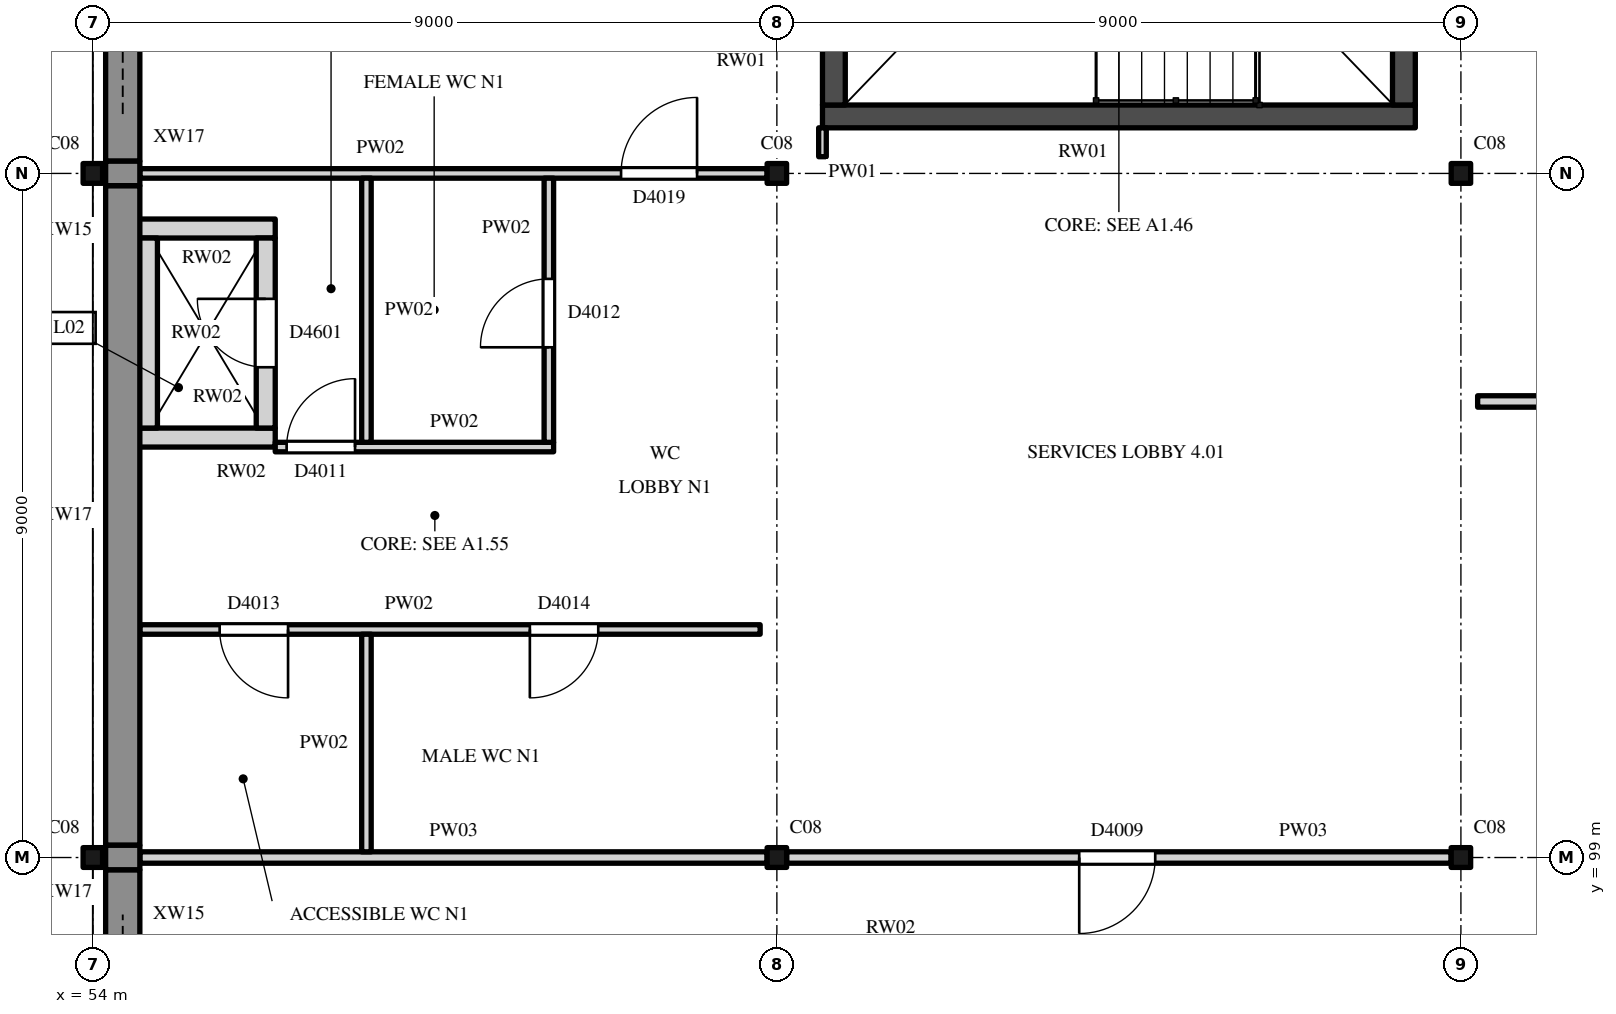
"""IFC4 building model, lengths in metres.
Left out: names, types, materials, properties, quantities, classifications, styles, units other than length and angle.
Written with IfcOpenShell. Run it as: python <this file> out.ifc"""

import sys

from ifc_helpers import new_model, si_unit, direction, frame, frame_2d, origin, origin_2d, place, context, subcontext, project, spatial, rectangle, i_section, extrude, element, fill, save


model = new_model("IFC4")
c1 = context("Model", 3, precision=1e-05, world=origin(), true_north=direction((0.0, 1.0)))
c2 = subcontext(c1, "Body", "Model", "MODEL_VIEW")
j1 = project(units=[si_unit("LENGTHUNIT", "METRE"), si_unit("PLANEANGLEUNIT", "RADIAN")], contexts=[c1])
p1 = place(None, origin())
s1 = spatial("IfcSite", under=j1, at=p1, CompositionType="ELEMENT")
p2 = place(p1, origin())
s2 = spatial("IfcBuilding", under=s1, at=p2, CompositionType="ELEMENT")
p3 = place(p2, frame((0.0, 0.0, 26.0)))
s3 = spatial("IfcBuildingStorey", under=s2, at=p3, CompositionType="ELEMENT", Elevation=26.0)
for number, where, z_axis, x_axis in (
    (1, (54.0, 99.0, 0.0), (0.0, 0.0, 1.0), (1.0, 0.0, 0.0)),
    (2, (63.0, 99.0, 0.0), (0.0, 0.0, 1.0), (1.0, 0.0, 0.0)),
    (3, (72.0, 99.0, 0.0), (0.0, 0.0, 1.0), (1.0, 0.0, 0.0)),
    (4, (54.0, 108.0, 0.0), (0.0, 0.0, 1.0), (1.0, 0.0, 0.0)),
    (5, (63.0, 108.0, 0.0), (0.0, 0.0, 1.0), (1.0, 0.0, 0.0)),
    (6, (72.0, 108.0, 0.0), (0.0, 0.0, 1.0), (1.0, 0.0, 0.0)),
):
    element("IfcColumn", number, at=place(p3, frame(where, z_axis=z_axis, x_axis=x_axis)), inside=s3, PredefinedType="COLUMN", context=c2, shape_type="SweptSolid", body=[
        extrude(i_section(OverallWidth=0.256, OverallDepth=0.26, WebThickness=0.01, FlangeThickness=0.017, FilletRadius=0.014, at=origin_2d()), origin(), (0.0, 0.0, 1.0), 5.0),
    ])
p4 = place(p3, frame((63.6, 108.75, 0.0), z_axis=(0.0, 0.0, 1.0), x_axis=(1.0, 0.0, 0.0)))
e7 = element("IfcWall", 7, at=p4, inside=s3, PredefinedType="SHEAR", context=c2, shape_type="SweptSolid", body=[
    extrude(rectangle(XDim=7.8, YDim=0.3, at=frame_2d((3.9, 0.0))), origin(), (0.0, 0.0, 1.0), 5.0),
])
p5 = place(p3, frame((63.75, 108.9, 0.0), z_axis=(0.0, 0.0, 1.0), x_axis=(0.0, 1.0, 0.0)))
e8 = element("IfcWall", 8, at=p5, inside=s3, PredefinedType="SHEAR", context=c2, shape_type="SweptSolid", body=[
    extrude(rectangle(XDim=7.8, YDim=0.3, at=frame_2d((3.9, 0.0))), origin(), (0.0, 0.0, 1.0), 5.0),
])
p6 = place(p3, frame((71.25, 108.9, 0.0), z_axis=(0.0, 0.0, 1.0), x_axis=(0.0, 1.0, 0.0)))
e9 = element("IfcWall", 9, at=p6, inside=s3, PredefinedType="SHEAR", context=c2, shape_type="SweptSolid", body=[
    extrude(rectangle(XDim=7.8, YDim=0.3, at=frame_2d((3.9, 0.0))), origin(), (0.0, 0.0, 1.0), 5.0),
])
p7 = place(p6, frame((3.0, 0.0, 0.0)))
e10 = element("IfcOpeningElement", 10, at=p7, cuts=e9, PredefinedType="OPENING", context=c2, shape_type="SweptSolid", body=[
    extrude(rectangle(XDim=1.2, YDim=2.1, at=frame_2d((0.6, 1.05))), frame((0.0, 0.16, 0.0), z_axis=(0.0, -1.0, 0.0), x_axis=(1.0, 0.0, 0.0)), (0.0, 0.0, 1.0), 0.32),
])
for number, where, z_axis, x_axis in (
    (11, (54.6, 104.525, 0.0), (0.0, 0.0, 1.0), (1.0, 0.0, 0.0)),
    (12, (54.6, 107.275, 0.0), (0.0, 0.0, 1.0), (1.0, 0.0, 0.0)),
):
    element("IfcWall", number, at=place(p3, frame(where, z_axis=z_axis, x_axis=x_axis)), inside=s3, PredefinedType="STANDARD", context=c2, shape_type="SweptSolid", body=[
        extrude(rectangle(XDim=1.8, YDim=0.25, at=frame_2d((0.9, 0.0))), origin(), (0.0, 0.0, 1.0), 5.0),
    ])
p8 = place(p3, frame((54.725, 104.65, 0.0), z_axis=(0.0, 0.0, 1.0), x_axis=(0.0, 1.0, 0.0)))
e13 = element("IfcWall", 13, at=p8, inside=s3, PredefinedType="STANDARD", context=c2, shape_type="SweptSolid", body=[
    extrude(rectangle(XDim=2.5, YDim=0.25, at=frame_2d((1.25, 0.0))), origin(), (0.0, 0.0, 1.0), 5.0),
])
p9 = place(p3, frame((56.275, 104.65, 0.0), z_axis=(0.0, 0.0, 1.0), x_axis=(0.0, 1.0, 0.0)))
e14 = element("IfcWall", 14, at=p9, inside=s3, PredefinedType="STANDARD", context=c2, shape_type="SweptSolid", body=[
    extrude(rectangle(XDim=2.5, YDim=0.25, at=frame_2d((1.25, 0.0))), origin(), (0.0, 0.0, 1.0), 5.0),
])
p10 = place(p9, frame((0.8, 0.0, 0.0)))
e15 = element("IfcOpeningElement", 15, at=p10, cuts=e14, PredefinedType="OPENING", context=c2, shape_type="SweptSolid", body=[
    extrude(rectangle(XDim=0.9, YDim=2.1, at=frame_2d((0.45, 1.05))), frame((0.0, 0.135, 0.0), z_axis=(0.0, -1.0, 0.0), x_axis=(1.0, 0.0, 0.0)), (0.0, 0.0, 1.0), 0.27),
])
p11 = place(p3, frame((54.394, 90.164, 0.0), z_axis=(0.0, 0.0, 1.0), x_axis=(0.0, 1.0, 0.0)))
e16 = element("IfcWall", 16, at=p11, inside=s3, PredefinedType="SOLIDWALL", context=c2, shape_type="SweptSolid", body=[
    extrude(rectangle(XDim=8.676, YDim=0.45, at=frame_2d((4.338, 0.0))), origin(), (0.0, 0.0, 1.0), 4.498),
])
p12 = place(p11, frame((0.586, 0.0, 1.6)))
e17 = element("IfcOpeningElement", 17, at=p12, cuts=e16, PredefinedType="OPENING", context=c2, shape_type="SweptSolid", body=[
    extrude(rectangle(XDim=7.5, YDim=1.2, at=frame_2d((3.75, 0.6))), frame((0.0, 0.235, 0.0), z_axis=(0.0, -1.0, 0.0), x_axis=(1.0, 0.0, 0.0)), (0.0, 0.0, 1.0), 0.47),
])
p13 = place(p3, frame((54.394, 99.161, 0.0), z_axis=(0.0, 0.0, 1.0), x_axis=(0.0, 1.0, 0.0)))
e18 = element("IfcWall", 18, at=p13, inside=s3, PredefinedType="SOLIDWALL", context=c2, shape_type="SweptSolid", body=[
    extrude(rectangle(XDim=8.678, YDim=0.45, at=frame_2d((4.339, 0.0))), origin(), (0.0, 0.0, 1.0), 4.498),
])
p14 = place(p3, frame((54.394, 108.161, 0.0), z_axis=(0.0, 0.0, 1.0), x_axis=(0.0, 1.0, 0.0)))
e19 = element("IfcWall", 19, at=p14, inside=s3, PredefinedType="SOLIDWALL", context=c2, shape_type="SweptSolid", body=[
    extrude(rectangle(XDim=8.676, YDim=0.45, at=frame_2d((4.338, 0.0))), origin(), (0.0, 0.0, 1.0), 4.498),
])
p15 = place(p14, frame((0.62, 0.0, 1.6)))
e20 = element("IfcOpeningElement", 20, at=p15, cuts=e19, PredefinedType="OPENING", context=c2, shape_type="SweptSolid", body=[
    extrude(rectangle(XDim=7.5, YDim=1.2, at=frame_2d((3.75, 0.6))), frame((0.0, 0.235, 0.0), z_axis=(0.0, -1.0, 0.0), x_axis=(1.0, 0.0, 0.0)), (0.0, 0.0, 1.0), 0.47),
])
for number, where, z_axis, x_axis in (
    (21, (54.394, 98.839, 0.0), (0.0, 0.0, 1.0), (0.0, 1.0, 0.0)),
    (22, (54.394, 107.839, 0.0), (0.0, 0.0, 1.0), (0.0, 1.0, 0.0)),
):
    element("IfcWall", number, at=place(p3, frame(where, z_axis=z_axis, x_axis=x_axis)), inside=s3, PredefinedType="SOLIDWALL", context=c2, shape_type="SweptSolid", body=[
        extrude(rectangle(XDim=0.322, YDim=0.45, at=frame_2d((0.161, 0.0))), origin(), (0.0, 0.0, 1.0), 4.498),
    ])
p16 = place(p3, frame((54.619, 99.0, 0.0), z_axis=(0.0, 0.0, 1.0), x_axis=(1.0, 0.0, 0.0)))
e23 = element("IfcWall", 23, at=p16, inside=s3, PredefinedType="PARTITIONING", context=c2, shape_type="SweptSolid", body=[
    extrude(rectangle(XDim=8.253, YDim=0.15, at=frame_2d((4.127, 0.0))), origin(), (0.0, 0.0, 1.0), 4.518),
])
p17 = place(p3, frame((63.128, 99.0, 0.0), z_axis=(0.0, 0.0, 1.0), x_axis=(1.0, 0.0, 0.0)))
e24 = element("IfcWall", 24, at=p17, inside=s3, PredefinedType="PARTITIONING", context=c2, shape_type="SweptSolid", body=[
    extrude(rectangle(XDim=8.744, YDim=0.15, at=frame_2d((4.372, 0.0))), origin(), (0.0, 0.0, 1.0), 4.518),
])
p18 = place(p17, frame((3.85, 0.0, 0.0)))
e25 = element("IfcOpeningElement", 25, at=p18, cuts=e24, PredefinedType="OPENING", context=c2, shape_type="SweptSolid", body=[
    extrude(rectangle(XDim=1.0, YDim=2.4, at=frame_2d((0.5, 1.2))), frame((0.0, 0.085, 0.0), z_axis=(0.0, -1.0, 0.0), x_axis=(1.0, 0.0, 0.0)), (0.0, 0.0, 1.0), 0.17),
])
p19 = place(p3, frame((54.619, 102.0, 0.0), z_axis=(0.0, 0.0, 1.0), x_axis=(1.0, 0.0, 0.0)))
e26 = element("IfcWall", 26, at=p19, inside=s3, PredefinedType="PARTITIONING", context=c2, shape_type="SweptSolid", body=[
    extrude(rectangle(XDim=8.161, YDim=0.125, at=frame_2d((4.081, 0.0))), origin(), (0.0, 0.0, 1.0), 4.521),
])
p20 = place(p19, frame((1.05, 0.0, 0.0)))
e27 = element("IfcOpeningElement", 27, at=p20, cuts=e26, PredefinedType="OPENING", context=c2, shape_type="SweptSolid", body=[
    extrude(rectangle(XDim=0.9, YDim=2.1, at=frame_2d((0.45, 1.05))), frame((0.0, 0.073, 0.0), z_axis=(0.0, -1.0, 0.0), x_axis=(1.0, 0.0, 0.0)), (0.0, 0.0, 1.0), 0.145),
])
p21 = place(p19, frame((5.131, 0.0, 0.0)))
e28 = element("IfcOpeningElement", 28, at=p21, cuts=e26, PredefinedType="OPENING", context=c2, shape_type="SweptSolid", body=[
    extrude(rectangle(XDim=0.9, YDim=2.1, at=frame_2d((0.45, 1.05))), frame((0.0, 0.073, 0.0), z_axis=(0.0, -1.0, 0.0), x_axis=(1.0, 0.0, 0.0)), (0.0, 0.0, 1.0), 0.145),
])
p22 = place(p3, frame((56.4, 104.4, 0.0), z_axis=(0.0, 0.0, 1.0), x_axis=(1.0, 0.0, 0.0)))
e29 = element("IfcWall", 29, at=p22, inside=s3, PredefinedType="PARTITIONING", context=c2, shape_type="SweptSolid", body=[
    extrude(rectangle(XDim=3.663, YDim=0.125, at=frame_2d((1.831, 0.0))), origin(), (0.0, 0.0, 1.0), 4.825),
])
p23 = place(p22, frame((0.15, 0.0, 0.0)))
e30 = element("IfcOpeningElement", 30, at=p23, cuts=e29, PredefinedType="OPENING", context=c2, shape_type="SweptSolid", body=[
    extrude(rectangle(XDim=0.9, YDim=2.1, at=frame_2d((0.45, 1.05))), frame((0.0, 0.073, 0.0), z_axis=(0.0, -1.0, 0.0), x_axis=(1.0, 0.0, 0.0)), (0.0, 0.0, 1.0), 0.145),
])
p24 = place(p3, frame((72.22, 105.0, 0.0), z_axis=(0.0, 0.0, 1.0), x_axis=(1.0, 0.0, 0.0)))
e31 = element("IfcWall", 31, at=p24, inside=s3, PredefinedType="PARTITIONING", context=c2, shape_type="SweptSolid", body=[
    extrude(rectangle(XDim=8.56, YDim=0.15, at=frame_2d((4.28, 0.0))), origin(), (0.0, 0.0, 1.0), 4.521),
])
p25 = place(p24, frame((3.05, 0.0, 0.0)))
e32 = element("IfcOpeningElement", 32, at=p25, cuts=e31, PredefinedType="OPENING", context=c2, shape_type="SweptSolid", body=[
    extrude(rectangle(XDim=2.4, YDim=3.0, at=frame_2d((1.2, 1.5))), frame((0.0, 0.085, 0.0), z_axis=(0.0, -1.0, 0.0), x_axis=(1.0, 0.0, 0.0)), (0.0, 0.0, 1.0), 0.17),
])
p26 = place(p3, frame((54.619, 108.0, 0.0), z_axis=(0.0, 0.0, 1.0), x_axis=(1.0, 0.0, 0.0)))
e33 = element("IfcWall", 33, at=p26, inside=s3, PredefinedType="PARTITIONING", context=c2, shape_type="SweptSolid", body=[
    extrude(rectangle(XDim=8.253, YDim=0.125, at=frame_2d((4.127, 0.0))), origin(), (0.0, 0.0, 1.0), 4.518),
])
p27 = place(p26, frame((6.331, 0.0, 0.0)))
e34 = element("IfcOpeningElement", 34, at=p27, cuts=e33, PredefinedType="OPENING", context=c2, shape_type="SweptSolid", body=[
    extrude(rectangle(XDim=1.0, YDim=2.1, at=frame_2d((0.5, 1.05))), frame((0.0, 0.073, 0.0), z_axis=(0.0, -1.0, 0.0), x_axis=(1.0, 0.0, 0.0)), (0.0, 0.0, 1.0), 0.145),
])
p28 = place(p3, frame((57.6, 99.075, 0.0), z_axis=(0.0, 0.0, 1.0), x_axis=(0.0, 1.0, 0.0)))
e35 = element("IfcWall", 35, at=p28, inside=s3, PredefinedType="PARTITIONING", context=c2, shape_type="SweptSolid", body=[
    extrude(rectangle(XDim=2.863, YDim=0.125, at=frame_2d((1.431, 0.0))), origin(), (0.0, 0.0, 1.0), 4.825),
])
p29 = place(p3, frame((57.6, 104.462, 0.0), z_axis=(0.0, 0.0, 1.0), x_axis=(0.0, 1.0, 0.0)))
e36 = element("IfcWall", 36, at=p29, inside=s3, PredefinedType="PARTITIONING", context=c2, shape_type="SweptSolid", body=[
    extrude(rectangle(XDim=3.475, YDim=0.125, at=frame_2d((1.738, 0.0))), origin(), (0.0, 0.0, 1.0), 4.825),
])
p30 = place(p3, frame((60.0, 104.462, 0.0), z_axis=(0.0, 0.0, 1.0), x_axis=(0.0, 1.0, 0.0)))
e37 = element("IfcWall", 37, at=p30, inside=s3, PredefinedType="PARTITIONING", context=c2, shape_type="SweptSolid", body=[
    extrude(rectangle(XDim=3.475, YDim=0.125, at=frame_2d((1.738, 0.0))), origin(), (0.0, 0.0, 1.0), 4.825),
])
p31 = place(p30, frame((1.25, 0.0, 0.0)))
e38 = element("IfcOpeningElement", 38, at=p31, cuts=e37, PredefinedType="OPENING", context=c2, shape_type="SweptSolid", body=[
    extrude(rectangle(XDim=0.9, YDim=2.1, at=frame_2d((0.45, 1.05))), frame((0.0, 0.073, 0.0), z_axis=(0.0, -1.0, 0.0), x_axis=(1.0, 0.0, 0.0)), (0.0, 0.0, 1.0), 0.145),
])
p32 = place(p3, frame((63.6, 108.22, 0.0), z_axis=(0.0, 0.0, 1.0), x_axis=(0.0, 1.0, 0.0)))
e39 = element("IfcWall", 39, at=p32, inside=s3, PredefinedType="PARTITIONING", context=c2, shape_type="SweptSolid", body=[
    extrude(rectangle(XDim=0.38, YDim=0.1, at=frame_2d((0.19, 0.0))), origin(), (0.0, 0.0, 1.0), 4.825),
])
p33 = place(p10, origin())
e40 = element("IfcDoor", 40, at=p33, inside=s3, OperationType="SINGLE_SWING_LEFT", PredefinedType="DOOR", context=c2, shape_type="SweptSolid", body=[
    extrude(rectangle(XDim=0.9, YDim=2.1, at=frame_2d((0.45, 1.05))), frame((0.0, 0.025, 0.0), z_axis=(0.0, -1.0, 0.0), x_axis=(1.0, 0.0, 0.0)), (0.0, 0.0, 1.0), 0.05),
])
fill(e15, e40)
p34 = place(p12, origin())
e41 = element("IfcWindow", 41, at=p34, inside=s3, PartitioningType="SINGLE_PANEL", PredefinedType="WINDOW", context=c2, shape_type="SweptSolid", body=[
    extrude(rectangle(XDim=7.5, YDim=1.2, at=frame_2d((3.75, 0.6))), frame((0.0, 0.03, 0.0), z_axis=(0.0, -1.0, 0.0), x_axis=(1.0, 0.0, 0.0)), (0.0, 0.0, 1.0), 0.06),
])
fill(e17, e41)
p35 = place(p15, origin())
e42 = element("IfcWindow", 42, at=p35, inside=s3, PartitioningType="SINGLE_PANEL", PredefinedType="WINDOW", context=c2, shape_type="SweptSolid", body=[
    extrude(rectangle(XDim=7.5, YDim=1.2, at=frame_2d((3.75, 0.6))), frame((0.0, 0.03, 0.0), z_axis=(0.0, -1.0, 0.0), x_axis=(1.0, 0.0, 0.0)), (0.0, 0.0, 1.0), 0.06),
])
fill(e20, e42)
p36 = place(p18, origin())
e43 = element("IfcDoor", 43, at=p36, inside=s3, OperationType="SINGLE_SWING_LEFT", PredefinedType="DOOR", context=c2, shape_type="SweptSolid", body=[
    extrude(rectangle(XDim=1.0, YDim=2.4, at=frame_2d((0.5, 1.2))), frame((0.0, 0.025, 0.0), z_axis=(0.0, -1.0, 0.0), x_axis=(1.0, 0.0, 0.0)), (0.0, 0.0, 1.0), 0.05),
])
fill(e25, e43)
p37 = place(p23, origin())
e44 = element("IfcDoor", 44, at=p37, inside=s3, OperationType="SINGLE_SWING_LEFT", PredefinedType="DOOR", context=c2, shape_type="SweptSolid", body=[
    extrude(rectangle(XDim=0.9, YDim=2.1, at=frame_2d((0.45, 1.05))), frame((0.0, 0.025, 0.0), z_axis=(0.0, -1.0, 0.0), x_axis=(1.0, 0.0, 0.0)), (0.0, 0.0, 1.0), 0.05),
])
fill(e30, e44)
p38 = place(p31, origin())
e45 = element("IfcDoor", 45, at=p38, inside=s3, OperationType="SINGLE_SWING_RIGHT", PredefinedType="DOOR", context=c2, shape_type="SweptSolid", body=[
    extrude(rectangle(XDim=0.9, YDim=2.1, at=frame_2d((0.45, 1.05))), frame((0.0, 0.025, 0.0), z_axis=(0.0, -1.0, 0.0), x_axis=(1.0, 0.0, 0.0)), (0.0, 0.0, 1.0), 0.05),
])
fill(e38, e45)
p39 = place(p20, origin())
e46 = element("IfcDoor", 46, at=p39, inside=s3, OperationType="SINGLE_SWING_RIGHT", PredefinedType="DOOR", context=c2, shape_type="SweptSolid", body=[
    extrude(rectangle(XDim=0.9, YDim=2.1, at=frame_2d((0.45, 1.05))), frame((0.0, 0.025, 0.0), z_axis=(0.0, -1.0, 0.0), x_axis=(1.0, 0.0, 0.0)), (0.0, 0.0, 1.0), 0.05),
])
fill(e27, e46)
p40 = place(p21, origin())
e47 = element("IfcDoor", 47, at=p40, inside=s3, OperationType="SINGLE_SWING_LEFT", PredefinedType="DOOR", context=c2, shape_type="SweptSolid", body=[
    extrude(rectangle(XDim=0.9, YDim=2.1, at=frame_2d((0.45, 1.05))), frame((0.0, 0.025, 0.0), z_axis=(0.0, -1.0, 0.0), x_axis=(1.0, 0.0, 0.0)), (0.0, 0.0, 1.0), 0.05),
])
fill(e28, e47)
p41 = place(p27, origin())
e48 = element("IfcDoor", 48, at=p41, inside=s3, OperationType="SINGLE_SWING_LEFT", PredefinedType="DOOR", context=c2, shape_type="SweptSolid", body=[
    extrude(rectangle(XDim=1.0, YDim=2.1, at=frame_2d((0.5, 1.05))), frame((0.0, 0.025, 0.0), z_axis=(0.0, -1.0, 0.0), x_axis=(1.0, 0.0, 0.0)), (0.0, 0.0, 1.0), 0.05),
])
fill(e34, e48)
save(model, sys.argv[1])
